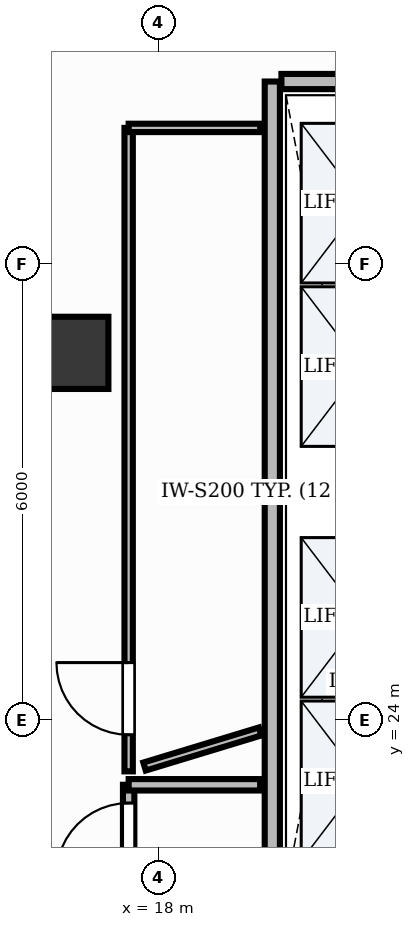
"""IFC4 building model, lengths in metres.
Left out: names, types, materials, properties, quantities, classifications, styles, units other than length and angle.
Written with IfcOpenShell. Run it as: python <this file> out.ifc"""

import sys

from ifc_helpers import new_model, si_unit, direction, frame, frame_2d, origin, origin_2d, place, context, subcontext, project, spatial, rectangle, extrude, element, fill, save


model = new_model("IFC4")
c1 = context("Model", 3, precision=1e-05, world=origin(), true_north=direction((0.0, 1.0)))
c2 = subcontext(c1, "Body", "Model", "MODEL_VIEW")
j1 = project(units=[si_unit("LENGTHUNIT", "METRE"), si_unit("PLANEANGLEUNIT", "RADIAN")], contexts=[c1])
p1 = place(None, origin())
s1 = spatial("IfcSite", under=j1, at=p1, CompositionType="ELEMENT")
p2 = place(p1, origin())
s2 = spatial("IfcBuilding", under=s1, at=p2, CompositionType="ELEMENT")
p3 = place(p2, frame((0.0, 0.0, 247.8)))
s3 = spatial("IfcBuildingStorey", under=s2, at=p3, CompositionType="ELEMENT", Elevation=247.8)
p4 = place(p3, frame((16.868, 28.83, -0.0), z_axis=(0.0, 0.0, 1.0), x_axis=(1.0, 0.0, 0.0)))
e1 = element("IfcColumn", 1, at=p4, inside=s3, PredefinedType="COLUMN", context=c2, shape_type="SweptSolid", body=[
    extrude(rectangle(XDim=0.95, YDim=0.95, at=origin_2d()), origin(), (0.0, 0.0, 1.0), 3.901),
])
p5 = place(p3, frame((19.5, 21.6, 0.0), z_axis=(0.0, 0.0, 1.0), x_axis=(0.0, 1.0, 0.0)))
e2 = element("IfcWall", 2, at=p5, inside=s3, PredefinedType="PARTITIONING", context=c2, shape_type="SweptSolid", body=[
    extrude(rectangle(XDim=10.8, YDim=0.2, at=frame_2d((5.4, 0.0))), origin(), (0.0, 0.0, 1.0), 2.91),
])
p6 = place(p3, frame((19.62, 32.4, 0.0), z_axis=(0.0, 0.0, 1.0), x_axis=(1.0, 0.0, 0.0)))
e3 = element("IfcWall", 3, at=p6, inside=s3, PredefinedType="PARTITIONING", context=c2, shape_type="SweptSolid", body=[
    extrude(rectangle(XDim=2.11, YDim=0.2, at=frame_2d((1.055, 0.0))), origin(), (0.0, 0.0, 1.0), 2.91),
])
p7 = place(p3, frame((17.61, 16.41, 0.0), z_axis=(0.0, 0.0, 1.0), x_axis=(0.0, 1.0, 0.0)))
e4 = element("IfcWall", 4, at=p7, inside=s3, PredefinedType="PARTITIONING", context=c2, shape_type="SweptSolid", body=[
    extrude(rectangle(XDim=6.738, YDim=0.15, at=frame_2d((3.369, 0.0))), origin(), (0.0, 0.0, 1.0), 2.91),
])
p8 = place(p7, frame((5.548, 0.0, 0.0)))
e5 = element("IfcOpeningElement", 5, at=p8, cuts=e4, PredefinedType="OPENING", context=c2, shape_type="SweptSolid", body=[
    extrude(rectangle(XDim=0.95, YDim=2.15, at=frame_2d((0.475, 1.075))), frame((0.0, 0.09, 0.0), z_axis=(0.0, -1.0, 0.0), x_axis=(1.0, 0.0, 0.0)), (0.0, 0.0, 1.0), 0.18),
])
p9 = place(p3, frame((17.61, 23.324, 0.0), z_axis=(0.0, 0.0, 1.0), x_axis=(0.0, 1.0, 0.0)))
e6 = element("IfcWall", 6, at=p9, inside=s3, PredefinedType="MOVABLE", context=c2, shape_type="SweptSolid", body=[
    extrude(rectangle(XDim=8.466, YDim=0.11, at=frame_2d((4.233, 0.0))), origin(), (0.0, 0.0, 1.0), 2.91),
])
p10 = place(p9, frame((0.481, 0.0, 0.0)))
e7 = element("IfcOpeningElement", 7, at=p10, cuts=e6, PredefinedType="OPENING", context=c2, shape_type="SweptSolid", body=[
    extrude(rectangle(XDim=0.95, YDim=2.15, at=frame_2d((0.475, 1.075))), frame((0.0, 0.07, 0.0), z_axis=(0.0, -1.0, 0.0), x_axis=(1.0, 0.0, 0.0)), (0.0, 0.0, 1.0), 0.14),
])
p11 = place(p3, frame((17.61, 23.148, 0.0), z_axis=(0.0, 0.0, 1.0), x_axis=(1.0, 0.0, 0.0)))
e8 = element("IfcWall", 8, at=p11, inside=s3, PredefinedType="PARTITIONING", context=c2, shape_type="SweptSolid", body=[
    extrude(rectangle(XDim=1.73, YDim=0.15, at=frame_2d((0.865, 0.0))), origin(), (0.0, 0.0, 1.0), 2.91),
])
p12 = place(p3, frame((19.34, 23.85, 0.0), z_axis=(0.0, 0.0, 1.0), x_axis=(-0.956878289182, -0.290489138681, 0.0)))
e9 = element("IfcWall", 9, at=p12, inside=s3, PredefinedType="MOVABLE", context=c2, shape_type="SweptSolid", body=[
    extrude(rectangle(XDim=1.589, YDim=0.11, at=frame_2d((0.795, 0.0))), origin(), (0.0, 0.0, 1.0), 2.91),
])
p13 = place(p3, frame((17.61, 31.79, 0.0), z_axis=(0.0, 0.0, 1.0), x_axis=(1.0, 0.0, 0.0)))
e10 = element("IfcWall", 10, at=p13, inside=s3, PredefinedType="MOVABLE", context=c2, shape_type="SweptSolid", body=[
    extrude(rectangle(XDim=1.73, YDim=0.11, at=frame_2d((0.865, 0.0))), origin(), (0.0, 0.0, 1.0), 2.91),
])
p14 = place(p8, origin())
e11 = element("IfcDoor", 11, at=p14, inside=s3, OperationType="SINGLE_SWING_LEFT", PredefinedType="DOOR", context=c2, shape_type="SweptSolid", body=[
    extrude(rectangle(XDim=0.95, YDim=2.15, at=frame_2d((0.475, 1.075))), frame((0.0, 0.025, 0.0), z_axis=(0.0, -1.0, 0.0), x_axis=(1.0, 0.0, 0.0)), (0.0, 0.0, 1.0), 0.05),
])
fill(e5, e11)
p15 = place(p10, origin())
e12 = element("IfcDoor", 12, at=p15, inside=s3, OperationType="SINGLE_SWING_RIGHT", PredefinedType="DOOR", context=c2, shape_type="SweptSolid", body=[
    extrude(rectangle(XDim=0.95, YDim=2.15, at=frame_2d((0.475, 1.075))), frame((0.0, 0.025, 0.0), z_axis=(0.0, -1.0, 0.0), x_axis=(1.0, 0.0, 0.0)), (0.0, 0.0, 1.0), 0.05),
])
fill(e7, e12)
save(model, sys.argv[1])
